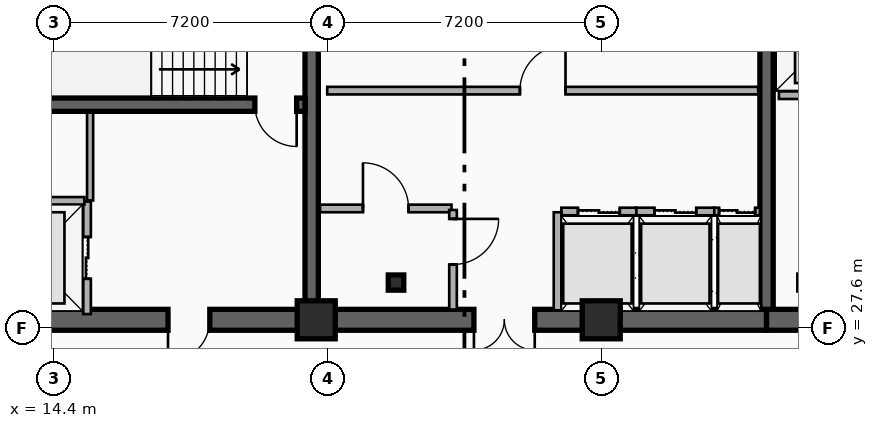
"""IFC4 building model, lengths in metres.
Left out: names, types, materials, properties, quantities, classifications, styles, units other than length and angle.
Written with IfcOpenShell. Run it as: python <this file> out.ifc"""

import sys

from ifc_helpers import new_model, si_unit, direction, frame, frame_2d, origin, origin_2d, place, context, subcontext, project, spatial, rectangle, i_section, extrude, element, fill, save


model = new_model("IFC4")
c1 = context("Model", 3, precision=1e-05, world=origin(), true_north=direction((0.0, 1.0)))
c2 = subcontext(c1, "Body", "Model", "MODEL_VIEW")
j1 = project(units=[si_unit("LENGTHUNIT", "METRE"), si_unit("PLANEANGLEUNIT", "RADIAN")], contexts=[c1])
p1 = place(None, origin())
s1 = spatial("IfcSite", under=j1, at=p1, CompositionType="ELEMENT")
p2 = place(p1, origin())
s2 = spatial("IfcBuilding", under=s1, at=p2, CompositionType="ELEMENT")
p3 = place(p2, frame((0.0, 0.0, 193.2)))
s3 = spatial("IfcBuildingStorey", under=s2, at=p3, CompositionType="ELEMENT", Elevation=193.2)
p4 = place(p3, frame((21.18, 27.82, 0.0), z_axis=(0.0, 0.0, 1.0), x_axis=(-1.0, 0.0, 0.0)))
e1 = element("IfcWall", 1, at=p4, inside=s3, PredefinedType="SHEAR", context=c2, shape_type="SweptSolid", body=[
    extrude(rectangle(XDim=9.03, YDim=0.55, at=frame_2d((4.515, 0.0))), origin(), (0.0, 0.0, 1.0), 3.6),
])
p5 = place(p4, frame((2.68, 0.0, 0.0)))
e2 = element("IfcOpeningElement", 2, at=p5, cuts=e1, PredefinedType="OPENING", context=c2, shape_type="SweptSolid", body=[
    extrude(rectangle(XDim=1.1, YDim=2.15, at=frame_2d((0.55, 1.075))), frame((0.0, 0.285, 0.0), z_axis=(0.0, -1.0, 0.0), x_axis=(1.0, 0.0, 0.0)), (0.0, 0.0, 1.0), 0.57),
])
p6 = place(p3, frame((33.15, 27.82, 0.0), z_axis=(0.0, 0.0, 1.0), x_axis=(-1.0, 0.0, 0.0)))
e3 = element("IfcWall", 3, at=p6, inside=s3, PredefinedType="SHEAR", context=c2, shape_type="SweptSolid", body=[
    extrude(rectangle(XDim=11.97, YDim=0.55, at=frame_2d((5.985, 0.0))), origin(), (0.0, 0.0, 1.0), 3.6),
])
p7 = place(p6, frame((6.1, 0.0, 0.0)))
e4 = element("IfcOpeningElement", 4, at=p7, cuts=e3, PredefinedType="OPENING", context=c2, shape_type="SweptSolid", body=[
    extrude(rectangle(XDim=1.6, YDim=2.2, at=frame_2d((0.8, 1.1))), frame((0.0, 0.285, 0.0), z_axis=(0.0, -1.0, 0.0), x_axis=(1.0, 0.0, 0.0)), (0.0, 0.0, 1.0), 0.57),
])
p8 = place(p3, frame((45.38, 27.82, 0.0), z_axis=(0.0, 0.0, 1.0), x_axis=(-1.0, 0.0, 0.0)))
e5 = element("IfcWall", 5, at=p8, inside=s3, PredefinedType="SHEAR", context=c2, shape_type="SweptSolid", body=[
    extrude(rectangle(XDim=12.23, YDim=0.55, at=frame_2d((6.115, 0.0))), origin(), (0.0, 0.0, 1.0), 3.6),
])
p9 = place(p8, frame((9.93, 0.0, 0.0)))
e6 = element("IfcOpeningElement", 6, at=p9, cuts=e5, PredefinedType="OPENING", context=c2, shape_type="SweptSolid", body=[
    extrude(rectangle(XDim=1.1, YDim=2.15, at=frame_2d((0.55, 1.075))), frame((0.0, 0.285, 0.0), z_axis=(0.0, -1.0, 0.0), x_axis=(1.0, 0.0, 0.0)), (0.0, 0.0, 1.0), 0.57),
])
p10 = place(p8, frame((6.23, 0.0, 0.0)))
e7 = element("IfcOpeningElement", 7, at=p10, cuts=e5, PredefinedType="OPENING", context=c2, shape_type="SweptSolid", body=[
    extrude(rectangle(XDim=1.1, YDim=2.15, at=frame_2d((0.55, 1.075))), frame((0.0, 0.285, 0.0), z_axis=(0.0, -1.0, 0.0), x_axis=(1.0, 0.0, 0.0)), (0.0, 0.0, 1.0), 0.57),
])
for number, where, z_axis, x_axis in (
    (8, (21.18, 28.095, 0.0), (0.0, 0.0, 1.0), (0.0, 1.0, 0.0)),
    (9, (33.15, 28.095, 0.0), (0.0, 0.0, 1.0), (0.0, 1.0, 0.0)),
):
    element("IfcWall", number, at=place(p3, frame(where, z_axis=z_axis, x_axis=x_axis)), inside=s3, PredefinedType="SHEAR", context=c2, shape_type="SweptSolid", body=[
        extrude(rectangle(XDim=8.68, YDim=0.35, at=frame_2d((4.34, 0.0))), origin(), (0.0, 0.0, 1.0), 3.6),
    ])
p11 = place(p3, frame((21.005, 33.48, 0.0), z_axis=(0.0, 0.0, 1.0), x_axis=(-1.0, 0.0, 0.0)))
e10 = element("IfcWall", 10, at=p11, inside=s3, PredefinedType="SHEAR", context=c2, shape_type="SweptSolid", body=[
    extrude(rectangle(XDim=8.58, YDim=0.35, at=frame_2d((4.29, 0.0))), origin(), (0.0, 0.0, 1.0), 3.6),
])
p12 = place(p11, frame((0.22, 0.0, 0.0)))
e11 = element("IfcOpeningElement", 11, at=p12, cuts=e10, PredefinedType="OPENING", context=c2, shape_type="SweptSolid", body=[
    extrude(rectangle(XDim=1.1, YDim=2.15, at=frame_2d((0.55, 1.075))), frame((0.0, 0.185, 0.0), z_axis=(0.0, -1.0, 0.0), x_axis=(1.0, 0.0, 0.0)), (0.0, 0.0, 1.0), 0.37),
])
p13 = place(p3, frame((23.4, 28.8, 0.0), z_axis=(0.0, 0.0, 1.0), x_axis=(1.0, 0.0, 0.0)))
e12 = element("IfcColumn", 12, at=p13, inside=s3, PredefinedType="COLUMN", context=c2, shape_type="SweptSolid", body=[
    extrude(i_section(OverallWidth=0.408, OverallDepth=0.4, WebThickness=0.025, FlangeThickness=0.039, FilletRadius=0.015, at=origin_2d()), origin(), (0.0, 0.0, 1.0), 3.6),
])
for number, where, z_axis, x_axis in (
    (13, (21.3, 27.82, 0.0), (0.0, 0.0, 1.0), (1.0, 0.0, 0.0)),
    (14, (28.8, 27.82, 0.0), (0.0, 0.0, 1.0), (1.0, 0.0, 0.0)),
):
    element("IfcColumn", number, at=place(p3, frame(where, z_axis=z_axis, x_axis=x_axis)), inside=s3, PredefinedType="COLUMN", context=c2, shape_type="SweptSolid", body=[
        extrude(rectangle(XDim=1.0, YDim=1.0, at=origin_2d()), origin(), (0.0, 0.0, 1.0), 3.6),
    ])
p14 = place(p3, frame((15.27, 27.97, 0.0), z_axis=(0.0, 0.0, 1.0), x_axis=(0.0, 1.0, 0.0)))
e15 = element("IfcWall", 15, at=p14, inside=s3, PredefinedType="PARTITIONING", context=c2, shape_type="SweptSolid", body=[
    extrude(rectangle(XDim=2.96, YDim=0.2, at=frame_2d((1.48, 0.0))), origin(), (0.0, 0.0, 1.0), 2.41),
])
p15 = place(p14, frame((0.93, 0.0, 0.0)))
e16 = element("IfcOpeningElement", 16, at=p15, cuts=e15, PredefinedType="OPENING", context=c2, shape_type="SweptSolid", body=[
    extrude(rectangle(XDim=1.1, YDim=2.15, at=frame_2d((0.55, 1.075))), frame((0.0, 0.11, 0.0), z_axis=(0.0, -1.0, 0.0), x_axis=(1.0, 0.0, 0.0)), (0.0, 0.0, 1.0), 0.22),
])
p16 = place(p3, frame((12.45, 30.95, 0.0), z_axis=(0.0, 0.0, 1.0), x_axis=(1.0, 0.0, 0.0)))
e17 = element("IfcWall", 17, at=p16, inside=s3, PredefinedType="PARTITIONING", context=c2, shape_type="SweptSolid", body=[
    extrude(rectangle(XDim=2.75, YDim=0.2, at=frame_2d((1.375, 0.0))), origin(), (0.0, 0.0, 1.0), 2.41),
])
p17 = place(p3, frame((33.475, 33.73, 0.0), z_axis=(0.0, 0.0, 1.0), x_axis=(1.0, 0.0, 0.0)))
e18 = element("IfcWall", 18, at=p17, inside=s3, PredefinedType="PARTITIONING", context=c2, shape_type="SweptSolid", body=[
    extrude(rectangle(XDim=2.725, YDim=0.2, at=frame_2d((1.362, 0.0))), origin(), (0.0, 0.0, 1.0), 2.41),
])
p18 = place(p17, frame((0.812, 0.0, 0.0)))
e19 = element("IfcOpeningElement", 19, at=p18, cuts=e18, PredefinedType="OPENING", context=c2, shape_type="SweptSolid", body=[
    extrude(rectangle(XDim=1.1, YDim=2.15, at=frame_2d((0.55, 1.075))), frame((0.0, 0.11, 0.0), z_axis=(0.0, -1.0, 0.0), x_axis=(1.0, 0.0, 0.0)), (0.0, 0.0, 1.0), 0.22),
])
p19 = place(p3, frame((27.75, 30.67, 0.0), z_axis=(0.0, 0.0, 1.0), x_axis=(1.0, 0.0, 0.0)))
e20 = element("IfcWall", 20, at=p19, inside=s3, PredefinedType="PARTITIONING", context=c2, shape_type="SweptSolid", body=[
    extrude(rectangle(XDim=1.975, YDim=0.2, at=frame_2d((0.988, 0.0))), origin(), (0.0, 0.0, 1.0), 2.41),
])
p20 = place(p19, frame((0.438, 0.0, 0.0)))
e21 = element("IfcOpeningElement", 21, at=p20, cuts=e20, PredefinedType="OPENING", context=c2, shape_type="SweptSolid", body=[
    extrude(rectangle(XDim=1.1, YDim=2.15, at=frame_2d((0.55, 1.075))), frame((0.0, 0.11, 0.0), z_axis=(0.0, -1.0, 0.0), x_axis=(1.0, 0.0, 0.0)), (0.0, 0.0, 1.0), 0.22),
])
p21 = place(p3, frame((27.65, 28.07, 0.0), z_axis=(0.0, 0.0, 1.0), x_axis=(0.0, 1.0, 0.0)))
e22 = element("IfcWall", 22, at=p21, inside=s3, PredefinedType="PARTITIONING", context=c2, shape_type="SweptSolid", body=[
    extrude(rectangle(XDim=2.58, YDim=0.2, at=frame_2d((1.29, 0.0))), origin(), (0.0, 0.0, 1.0), 2.41),
])
p22 = place(p3, frame((29.725, 30.67, 0.0), z_axis=(0.0, 0.0, 1.0), x_axis=(1.0, 0.0, 0.0)))
e23 = element("IfcWall", 23, at=p22, inside=s3, PredefinedType="PARTITIONING", context=c2, shape_type="SweptSolid", body=[
    extrude(rectangle(XDim=2.05, YDim=0.2, at=frame_2d((1.025, 0.0))), origin(), (0.0, 0.0, 1.0), 2.72),
])
p23 = place(p22, frame((0.475, 0.0, 0.0)))
e24 = element("IfcOpeningElement", 24, at=p23, cuts=e23, PredefinedType="OPENING", context=c2, shape_type="SweptSolid", body=[
    extrude(rectangle(XDim=1.1, YDim=2.15, at=frame_2d((0.55, 1.075))), frame((0.0, 0.11, 0.0), z_axis=(0.0, -1.0, 0.0), x_axis=(1.0, 0.0, 0.0)), (0.0, 0.0, 1.0), 0.22),
])
p24 = place(p3, frame((31.775, 30.67, 0.0), z_axis=(0.0, 0.0, 1.0), x_axis=(1.0, 0.0, 0.0)))
e25 = element("IfcWall", 25, at=p24, inside=s3, PredefinedType="PARTITIONING", context=c2, shape_type="SweptSolid", body=[
    extrude(rectangle(XDim=1.2, YDim=0.2, at=frame_2d((0.6, 0.0))), origin(), (0.0, 0.0, 1.0), 2.72),
])
p25 = place(p24, frame((0.125, 0.0, 0.0)))
e26 = element("IfcOpeningElement", 26, at=p25, cuts=e25, PredefinedType="OPENING", context=c2, shape_type="SweptSolid", body=[
    extrude(rectangle(XDim=0.95, YDim=2.15, at=frame_2d((0.475, 1.075))), frame((0.0, 0.11, 0.0), z_axis=(0.0, -1.0, 0.0), x_axis=(1.0, 0.0, 0.0)), (0.0, 0.0, 1.0), 0.22),
])
p26 = place(p3, frame((21.4, 30.75, 0.0), z_axis=(0.0, 0.0, 1.0), x_axis=(1.0, 0.0, 0.0)))
e27 = element("IfcWall", 27, at=p26, inside=s3, PredefinedType="PARTITIONING", context=c2, shape_type="SweptSolid", body=[
    extrude(rectangle(XDim=3.46, YDim=0.2, at=frame_2d((1.73, 0.0))), origin(), (0.0, 0.0, 1.0), 2.41),
])
p27 = place(p26, frame((1.13, 0.0, 0.0)))
e28 = element("IfcOpeningElement", 28, at=p27, cuts=e27, PredefinedType="OPENING", context=c2, shape_type="SweptSolid", body=[
    extrude(rectangle(XDim=1.2, YDim=2.15, at=frame_2d((0.6, 1.075))), frame((0.0, 0.11, 0.0), z_axis=(0.0, -1.0, 0.0), x_axis=(1.0, 0.0, 0.0)), (0.0, 0.0, 1.0), 0.22),
])
p28 = place(p3, frame((21.59, 33.85, 0.0), z_axis=(0.0, 0.0, 1.0), x_axis=(1.0, 0.0, 0.0)))
e29 = element("IfcWall", 29, at=p28, inside=s3, PredefinedType="PARTITIONING", context=c2, shape_type="SweptSolid", body=[
    extrude(rectangle(XDim=11.34, YDim=0.2, at=frame_2d((5.67, 0.0))), origin(), (0.0, 0.0, 1.0), 2.41),
])
p29 = place(p28, frame((5.07, 0.0, 0.0)))
e30 = element("IfcOpeningElement", 30, at=p29, cuts=e29, PredefinedType="OPENING", context=c2, shape_type="SweptSolid", body=[
    extrude(rectangle(XDim=1.2, YDim=2.15, at=frame_2d((0.6, 1.075))), frame((0.0, 0.11, 0.0), z_axis=(0.0, -1.0, 0.0), x_axis=(1.0, 0.0, 0.0)), (0.0, 0.0, 1.0), 0.22),
])
p30 = place(p3, frame((24.9, 30.71, 0.0), z_axis=(0.0, 0.0, 1.0), x_axis=(0.0, -1.0, 0.0)))
e31 = element("IfcWall", 31, at=p30, inside=s3, PredefinedType="PARTITIONING", context=c2, shape_type="SweptSolid", body=[
    extrude(rectangle(XDim=2.62, YDim=0.2, at=frame_2d((1.31, 0.0))), origin(), (0.0, 0.0, 1.0), 2.72),
])
p31 = place(p30, frame((0.235, 0.0, 0.0)))
e32 = element("IfcOpeningElement", 32, at=p31, cuts=e31, PredefinedType="OPENING", context=c2, shape_type="SweptSolid", body=[
    extrude(rectangle(XDim=1.2, YDim=2.15, at=frame_2d((0.6, 1.075))), frame((0.0, 0.11, 0.0), z_axis=(0.0, -1.0, 0.0), x_axis=(1.0, 0.0, 0.0)), (0.0, 0.0, 1.0), 0.22),
])
p32 = place(p3, frame((15.35, 30.96, 0.0), z_axis=(0.0, 0.0, 1.0), x_axis=(0.0, 1.0, 0.0)))
e33 = element("IfcWall", 33, at=p32, inside=s3, PredefinedType="PARTITIONING", context=c2, shape_type="SweptSolid", body=[
    extrude(rectangle(XDim=2.31, YDim=0.16, at=frame_2d((1.155, 0.0))), origin(), (0.0, 0.0, 1.0), 3.34),
])
p33 = place(p15, origin())
e34 = element("IfcDoor", 34, at=p33, inside=s3, OperationType="DOUBLE_DOOR_SLIDING", PredefinedType="DOOR", context=c2, shape_type="SweptSolid", body=[
    extrude(rectangle(XDim=1.1, YDim=2.15, at=frame_2d((0.55, 1.075))), frame((0.0, 0.025, 0.0), z_axis=(0.0, -1.0, 0.0), x_axis=(1.0, 0.0, 0.0)), (0.0, 0.0, 1.0), 0.05),
])
fill(e16, e34)
p34 = place(p20, origin())
e35 = element("IfcDoor", 35, at=p34, inside=s3, OperationType="DOUBLE_DOOR_SLIDING", PredefinedType="DOOR", context=c2, shape_type="SweptSolid", body=[
    extrude(rectangle(XDim=1.1, YDim=2.15, at=frame_2d((0.55, 1.075))), frame((0.0, 0.025, 0.0), z_axis=(0.0, -1.0, 0.0), x_axis=(1.0, 0.0, 0.0)), (0.0, 0.0, 1.0), 0.05),
])
fill(e21, e35)
p35 = place(p23, origin())
e36 = element("IfcDoor", 36, at=p35, inside=s3, OperationType="DOUBLE_DOOR_SLIDING", PredefinedType="DOOR", context=c2, shape_type="SweptSolid", body=[
    extrude(rectangle(XDim=1.1, YDim=2.15, at=frame_2d((0.55, 1.075))), frame((0.0, 0.025, 0.0), z_axis=(0.0, -1.0, 0.0), x_axis=(1.0, 0.0, 0.0)), (0.0, 0.0, 1.0), 0.05),
])
fill(e24, e36)
p36 = place(p25, origin())
e37 = element("IfcDoor", 37, at=p36, inside=s3, OperationType="DOUBLE_DOOR_SLIDING", PredefinedType="DOOR", context=c2, shape_type="SweptSolid", body=[
    extrude(rectangle(XDim=0.95, YDim=2.15, at=frame_2d((0.475, 1.075))), frame((0.0, 0.025, 0.0), z_axis=(0.0, -1.0, 0.0), x_axis=(1.0, 0.0, 0.0)), (0.0, 0.0, 1.0), 0.05),
])
fill(e26, e37)
p37 = place(p12, origin())
e38 = element("IfcDoor", 38, at=p37, inside=s3, OperationType="SINGLE_SWING_LEFT", PredefinedType="DOOR", context=c2, shape_type="SweptSolid", body=[
    extrude(rectangle(XDim=1.1, YDim=2.15, at=frame_2d((0.55, 1.075))), frame((0.0, 0.025, 0.0), z_axis=(0.0, -1.0, 0.0), x_axis=(1.0, 0.0, 0.0)), (0.0, 0.0, 1.0), 0.05),
])
fill(e11, e38)
p38 = place(p5, origin())
e39 = element("IfcDoor", 39, at=p38, inside=s3, OperationType="SINGLE_SWING_RIGHT", PredefinedType="DOOR", context=c2, shape_type="SweptSolid", body=[
    extrude(rectangle(XDim=1.1, YDim=2.15, at=frame_2d((0.55, 1.075))), frame((0.0, 0.025, 0.0), z_axis=(0.0, -1.0, 0.0), x_axis=(1.0, 0.0, 0.0)), (0.0, 0.0, 1.0), 0.05),
])
fill(e2, e39)
p39 = place(p7, origin())
e40 = element("IfcDoor", 40, at=p39, inside=s3, OperationType="SINGLE_SWING_LEFT", PredefinedType="DOOR", context=c2, shape_type="SweptSolid", body=[
    extrude(rectangle(XDim=1.6, YDim=2.2, at=frame_2d((0.8, 1.1))), frame((0.0, 0.025, 0.0), z_axis=(0.0, -1.0, 0.0), x_axis=(1.0, 0.0, 0.0)), (0.0, 0.0, 1.0), 0.05),
])
fill(e4, e40)
p40 = place(p27, origin())
e41 = element("IfcDoor", 41, at=p40, inside=s3, OperationType="SINGLE_SWING_LEFT", PredefinedType="DOOR", context=c2, shape_type="SweptSolid", body=[
    extrude(rectangle(XDim=1.2, YDim=2.15, at=frame_2d((0.6, 1.075))), frame((0.0, 0.025, 0.0), z_axis=(0.0, -1.0, 0.0), x_axis=(1.0, 0.0, 0.0)), (0.0, 0.0, 1.0), 0.05),
])
fill(e28, e41)
p41 = place(p29, origin())
e42 = element("IfcDoor", 42, at=p41, inside=s3, OperationType="SINGLE_SWING_RIGHT", PredefinedType="DOOR", context=c2, shape_type="SweptSolid", body=[
    extrude(rectangle(XDim=1.2, YDim=2.15, at=frame_2d((0.6, 1.075))), frame((0.0, 0.025, 0.0), z_axis=(0.0, -1.0, 0.0), x_axis=(1.0, 0.0, 0.0)), (0.0, 0.0, 1.0), 0.05),
])
fill(e30, e42)
p42 = place(p31, origin())
e43 = element("IfcDoor", 43, at=p42, inside=s3, OperationType="SINGLE_SWING_LEFT", PredefinedType="DOOR", context=c2, shape_type="SweptSolid", body=[
    extrude(rectangle(XDim=1.2, YDim=2.15, at=frame_2d((0.6, 1.075))), frame((0.0, 0.025, 0.0), z_axis=(0.0, -1.0, 0.0), x_axis=(1.0, 0.0, 0.0)), (0.0, 0.0, 1.0), 0.05),
])
fill(e32, e43)
save(model, sys.argv[1])
